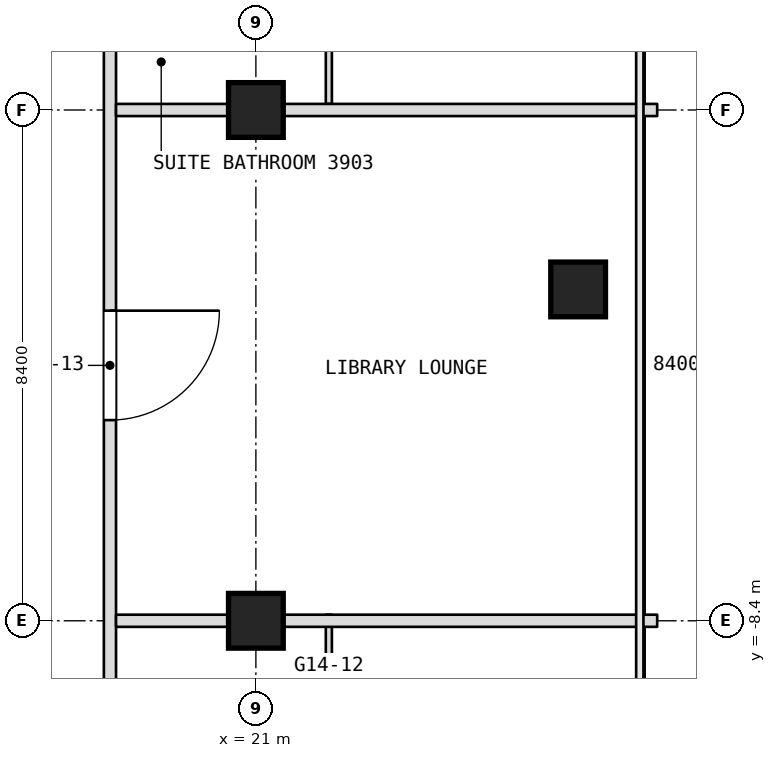
"""IFC4 building model, lengths in metres.
Left out: names, types, materials, properties, quantities, classifications, styles, units other than length and angle.
Written with IfcOpenShell. Run it as: python <this file> out.ifc"""

import sys

from ifc_helpers import new_model, si_unit, direction, frame, frame_2d, origin, origin_2d, place, context, subcontext, project, spatial, rectangle, extrude, element, fill, save


model = new_model("IFC4")
c1 = context("Model", 3, precision=1e-05, world=origin(), true_north=direction((0.0, 1.0)))
c2 = subcontext(c1, "Body", "Model", "MODEL_VIEW")
j1 = project(units=[si_unit("LENGTHUNIT", "METRE"), si_unit("PLANEANGLEUNIT", "RADIAN")], contexts=[c1])
p1 = place(None, origin())
s1 = spatial("IfcSite", under=j1, at=p1, CompositionType="ELEMENT")
p2 = place(p1, origin())
s2 = spatial("IfcBuilding", under=s1, at=p2, CompositionType="ELEMENT")
p3 = place(p2, frame((0.0, 0.0, 166.1)))
s3 = spatial("IfcBuildingStorey", under=s2, at=p3, CompositionType="ELEMENT", Elevation=166.1)
for number, where, z_axis, x_axis in (
    (1, (21.0, -8.4, 0.0), (0.0, 0.0, 1.0), (1.0, 0.0, 0.0)),
    (2, (21.0, 0.0, 0.0), (0.0, 0.0, 1.0), (1.0, 0.0, 0.0)),
    (3, (26.3, -2.951, 0.0), (0.0, 0.0, 1.0), (1.0, 0.0, 0.0)),
):
    element("IfcColumn", number, at=place(p3, frame(where, z_axis=z_axis, x_axis=x_axis)), inside=s3, PredefinedType="COLUMN", context=c2, shape_type="SweptSolid", body=[
        extrude(rectangle(XDim=0.9, YDim=0.9, at=origin_2d()), origin(), (0.0, 0.0, 1.0), 3.6),
    ])
p4 = place(p3, frame((22.2, -10.75, 0.0), z_axis=(0.0, 0.0, 1.0), x_axis=(0.0, 1.0, 0.0)))
e4 = element("IfcWall", 4, at=p4, inside=s3, PredefinedType="PARTITIONING", context=c2, shape_type="SweptSolid", body=[
    extrude(rectangle(XDim=2.45, YDim=0.1, at=frame_2d((1.225, 0.0))), origin(), (0.0, 0.0, 1.0), 3.3),
])
p5 = place(p4, frame((0.15, 0.0, 0.0)))
e5 = element("IfcOpeningElement", 5, at=p5, cuts=e4, PredefinedType="OPENING", context=c2, shape_type="SweptSolid", body=[
    extrude(rectangle(XDim=0.9, YDim=2.1, at=frame_2d((0.45, 1.05))), frame((0.0, 0.05, 0.0), z_axis=(0.0, -1.0, 0.0), x_axis=(1.0, 0.0, 0.0)), (0.0, 0.0, 1.0), 0.1),
])
p6 = place(p3, frame((22.2, 0.1, 0.0), z_axis=(0.0, 0.0, 1.0), x_axis=(0.0, 1.0, 0.0)))
e6 = element("IfcWall", 6, at=p6, inside=s3, PredefinedType="PARTITIONING", context=c2, shape_type="SweptSolid", body=[
    extrude(rectangle(XDim=2.35, YDim=0.1, at=frame_2d((1.175, 0.0))), origin(), (0.0, 0.0, 1.0), 3.3),
])
p7 = place(p3, frame((18.6, -21.708, 0.0), z_axis=(0.0, 0.0, 1.0), x_axis=(0.0, 1.0, 0.0)))
e7 = element("IfcWall", 7, at=p7, inside=s3, PredefinedType="PARTITIONING", context=c2, shape_type="SweptSolid", body=[
    extrude(rectangle(XDim=49.648, YDim=0.2, at=frame_2d((24.824, 0.0))), origin(), (0.0, 0.0, 1.0), 3.3),
])
p8 = place(p7, frame((2.204, 0.0, 0.0)))
e8 = element("IfcOpeningElement", 8, at=p8, cuts=e7, PredefinedType="OPENING", context=c2, shape_type="SweptSolid", body=[
    extrude(rectangle(XDim=0.9, YDim=2.1, at=frame_2d((0.45, 1.05))), frame((0.0, 0.1, 0.0), z_axis=(0.0, -1.0, 0.0), x_axis=(1.0, 0.0, 0.0)), (0.0, 0.0, 1.0), 0.2),
])
p9 = place(p7, frame((8.608, 0.0, 0.0)))
e9 = element("IfcOpeningElement", 9, at=p9, cuts=e7, PredefinedType="OPENING", context=c2, shape_type="SweptSolid", body=[
    extrude(rectangle(XDim=1.1, YDim=2.1, at=frame_2d((0.55, 1.05))), frame((0.0, 0.1, 0.0), z_axis=(0.0, -1.0, 0.0), x_axis=(1.0, 0.0, 0.0)), (0.0, 0.0, 1.0), 0.2),
])
p10 = place(p7, frame((16.608, 0.0, 0.0)))
e10 = element("IfcOpeningElement", 10, at=p10, cuts=e7, PredefinedType="OPENING", context=c2, shape_type="SweptSolid", body=[
    extrude(rectangle(XDim=1.8, YDim=2.1, at=frame_2d((0.9, 1.05))), frame((0.0, 0.1, 0.0), z_axis=(0.0, -1.0, 0.0), x_axis=(1.0, 0.0, 0.0)), (0.0, 0.0, 1.0), 0.2),
])
p11 = place(p7, frame((27.458, 0.0, 0.0)))
e11 = element("IfcOpeningElement", 11, at=p11, cuts=e7, PredefinedType="OPENING", context=c2, shape_type="SweptSolid", body=[
    extrude(rectangle(XDim=1.1, YDim=2.1, at=frame_2d((0.55, 1.05))), frame((0.0, 0.1, 0.0), z_axis=(0.0, -1.0, 0.0), x_axis=(1.0, 0.0, 0.0)), (0.0, 0.0, 1.0), 0.2),
])
p12 = place(p7, frame((30.508, 0.0, 0.0)))
e12 = element("IfcOpeningElement", 12, at=p12, cuts=e7, PredefinedType="OPENING", context=c2, shape_type="SweptSolid", body=[
    extrude(rectangle(XDim=1.0, YDim=2.1, at=frame_2d((0.5, 1.05))), frame((0.0, 0.1, 0.0), z_axis=(0.0, -1.0, 0.0), x_axis=(1.0, 0.0, 0.0)), (0.0, 0.0, 1.0), 0.2),
])
p13 = place(p7, frame((37.108, 0.0, 0.0)))
e13 = element("IfcOpeningElement", 13, at=p13, cuts=e7, PredefinedType="OPENING", context=c2, shape_type="SweptSolid", body=[
    extrude(rectangle(XDim=1.0, YDim=2.1, at=frame_2d((0.5, 1.05))), frame((0.0, 0.1, 0.0), z_axis=(0.0, -1.0, 0.0), x_axis=(1.0, 0.0, 0.0)), (0.0, 0.0, 1.0), 0.2),
])
p14 = place(p7, frame((42.608, 0.0, 0.0)))
e14 = element("IfcOpeningElement", 14, at=p14, cuts=e7, PredefinedType="OPENING", context=c2, shape_type="SweptSolid", body=[
    extrude(rectangle(XDim=1.0, YDim=2.1, at=frame_2d((0.5, 1.05))), frame((0.0, 0.1, 0.0), z_axis=(0.0, -1.0, 0.0), x_axis=(1.0, 0.0, 0.0)), (0.0, 0.0, 1.0), 0.2),
])
p15 = place(p7, frame((44.608, 0.0, 0.0)))
e15 = element("IfcOpeningElement", 15, at=p15, cuts=e7, PredefinedType="OPENING", context=c2, shape_type="SweptSolid", body=[
    extrude(rectangle(XDim=1.0, YDim=2.1, at=frame_2d((0.5, 1.05))), frame((0.0, 0.1, 0.0), z_axis=(0.0, -1.0, 0.0), x_axis=(1.0, 0.0, 0.0)), (0.0, 0.0, 1.0), 0.2),
])
for number, where, z_axis, x_axis in (
    (16, (18.7, -8.4, 0.0), (0.0, 0.0, 1.0), (1.0, 0.0, 0.0)),
    (17, (18.7, 0.0, 0.0), (0.0, 0.0, 1.0), (1.0, 0.0, 0.0)),
):
    element("IfcWall", number, at=place(p3, frame(where, z_axis=z_axis, x_axis=x_axis)), inside=s3, PredefinedType="PARTITIONING", context=c2, shape_type="SweptSolid", body=[
        extrude(rectangle(XDim=8.9, YDim=0.2, at=frame_2d((4.45, 0.0))), origin(), (0.0, 0.0, 1.0), 2.85),
    ])
p16 = place(p10, origin())
e18 = element("IfcDoor", 18, at=p16, inside=s3, OperationType="DOUBLE_DOOR_SINGLE_SWING", PredefinedType="DOOR", context=c2, shape_type="SweptSolid", body=[
    extrude(rectangle(XDim=1.8, YDim=2.1, at=frame_2d((0.9, 1.05))), frame((0.0, 0.025, 0.0), z_axis=(0.0, -1.0, 0.0), x_axis=(1.0, 0.0, 0.0)), (0.0, 0.0, 1.0), 0.05),
])
fill(e10, e18)
save(model, sys.argv[1])
